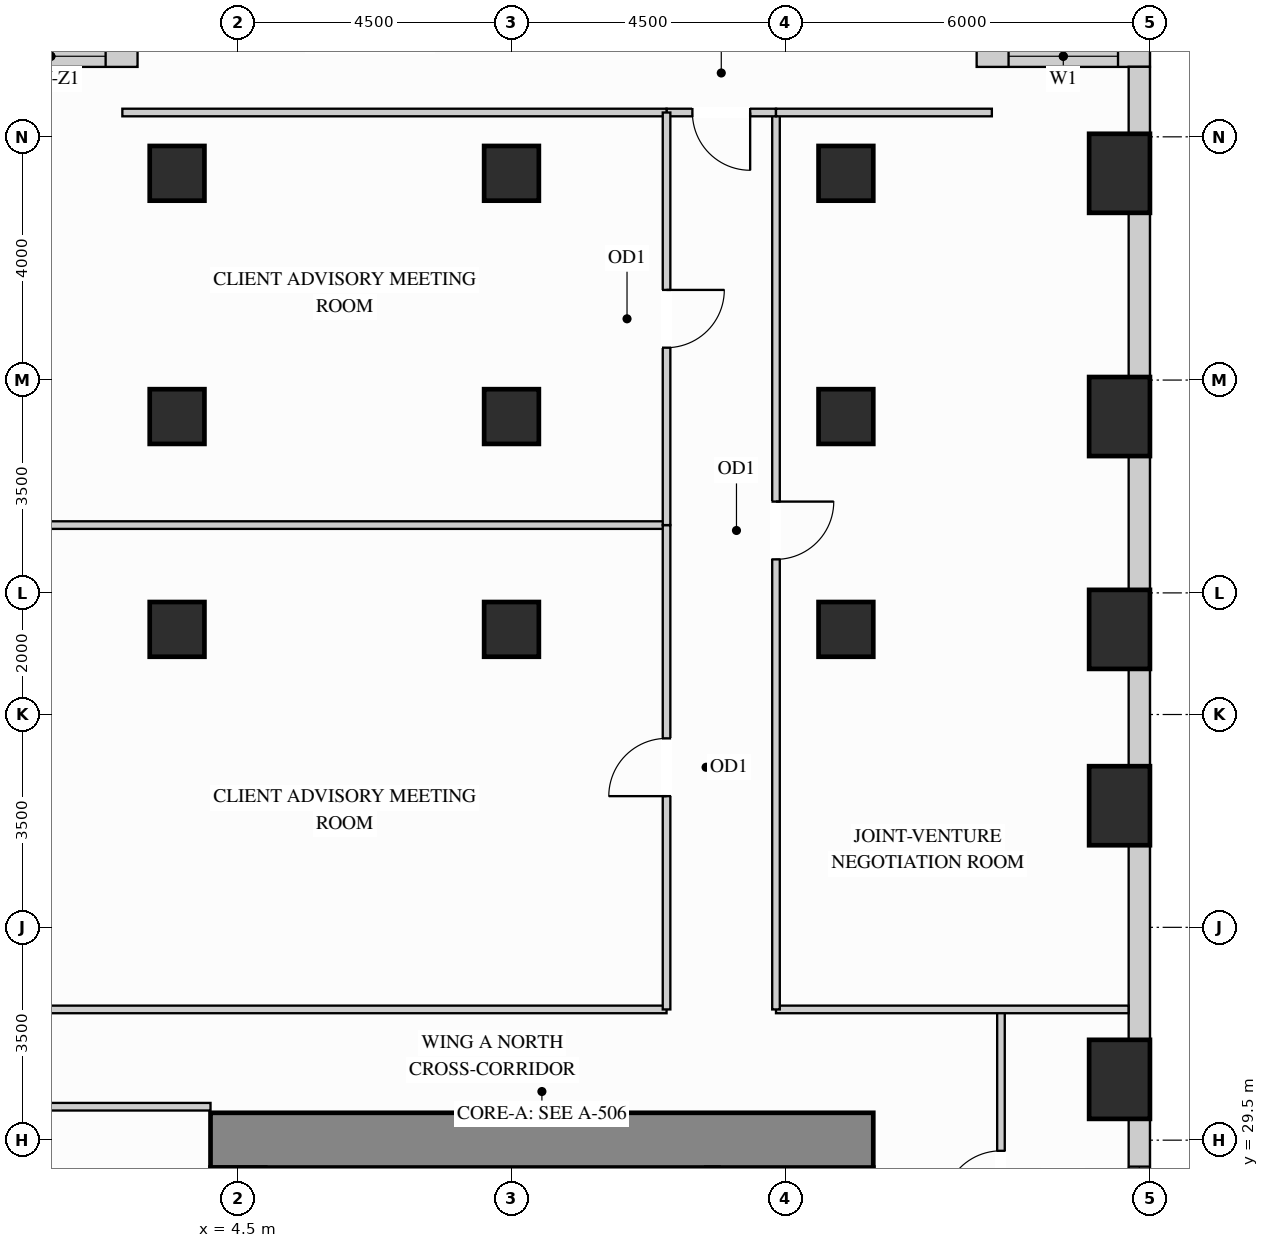
"""IFC4 building model, lengths in metres.
Left out: names, types, materials, properties, quantities, classifications, styles, units other than length and angle.
Written with IfcOpenShell. Run it as: python <this file> out.ifc"""

import sys

from ifc_helpers import new_model, si_unit, direction, frame, frame_2d, origin, origin_2d, place, context, subcontext, project, spatial, rectangle, extrude, source, transform, mapped, element, fill, save


model = new_model("IFC4")
c1 = context("Model", 3, precision=1e-05, world=origin(), true_north=direction((0.0, 1.0)))
c2 = subcontext(c1, "Body", "Model", "MODEL_VIEW")
j1 = project(units=[si_unit("LENGTHUNIT", "METRE"), si_unit("PLANEANGLEUNIT", "RADIAN")], contexts=[c1])
p1 = place(None, origin())
s1 = spatial("IfcSite", under=j1, at=p1, CompositionType="ELEMENT")
p2 = place(p1, origin())
s2 = spatial("IfcBuilding", under=s1, at=p2, CompositionType="ELEMENT")
p3 = place(p2, frame((0.0, 0.0, 62.1)))
s3 = spatial("IfcBuildingStorey", under=s2, at=p3, CompositionType="ELEMENT", Elevation=62.1)
m1 = source(origin(), c2, "Body", "SweptSolid", [
    extrude(rectangle(XDim=0.9, YDim=0.9, at=origin_2d()), origin(), (0.0, 0.0, 1.0), 3.38),
])
for number, where, z_axis, x_axis in (
    (1, (14.5, 37.9, 0.0), (0.0, 0.0, 1.0), (1.0, 0.0, 0.0)),
    (2, (14.5, 41.4, 0.0), (0.0, 0.0, 1.0), (1.0, 0.0, 0.0)),
    (3, (14.5, 45.4, 0.0), (0.0, 0.0, 1.0), (1.0, 0.0, 0.0)),
    (4, (3.5, 37.9, 0.0), (0.0, 0.0, 1.0), (1.0, 0.0, 0.0)),
    (5, (3.5, 41.4, 0.0), (0.0, 0.0, 1.0), (1.0, 0.0, 0.0)),
    (6, (3.5, 45.4, 0.0), (0.0, 0.0, 1.0), (1.0, 0.0, 0.0)),
    (7, (9.0, 37.9, 0.0), (0.0, 0.0, 1.0), (1.0, 0.0, 0.0)),
    (8, (9.0, 41.4, 0.0), (0.0, 0.0, 1.0), (1.0, 0.0, 0.0)),
    (9, (9.0, 45.4, 0.0), (0.0, 0.0, 1.0), (1.0, 0.0, 0.0)),
):
    element("IfcColumn", number, at=place(p3, frame(where, z_axis=z_axis, x_axis=x_axis)), inside=s3, PredefinedType="COLUMN", context=c2, shape_type="MappedRepresentation", body=[
        mapped(m1, transform((0.0, 0.0, 0.0), x_axis=(1.0, 0.0, 0.0), y_axis=(0.0, 1.0, 0.0), z_axis=(0.0, 0.0, 1.0))),
    ])
m2 = source(origin(), c2, "Body", "SweptSolid", [
    extrude(rectangle(XDim=1.0, YDim=1.3, at=origin_2d()), origin(), (0.0, 0.0, 1.0), 3.38),
])
for number, where, z_axis, x_axis in (
    (10, (19.0, 30.5, 0.0), (0.0, 0.0, 1.0), (1.0, 0.0, 0.0)),
    (11, (19.0, 35.0, 0.0), (0.0, 0.0, 1.0), (1.0, 0.0, 0.0)),
    (12, (19.0, 37.9, 0.0), (0.0, 0.0, 1.0), (1.0, 0.0, 0.0)),
    (13, (19.0, 41.4, 0.0), (0.0, 0.0, 1.0), (1.0, 0.0, 0.0)),
    (14, (19.0, 45.4, 0.0), (0.0, 0.0, 1.0), (1.0, 0.0, 0.0)),
):
    element("IfcColumn", number, at=place(p3, frame(where, z_axis=z_axis, x_axis=x_axis)), inside=s3, PredefinedType="COLUMN", context=c2, shape_type="MappedRepresentation", body=[
        mapped(m2, transform((0.0, 0.0, 0.0), x_axis=(1.0, 0.0, 0.0), y_axis=(0.0, 1.0, 0.0), z_axis=(0.0, 0.0, 1.0))),
    ])
m3 = source(origin(), c2, "Body", "SweptSolid", [
    extrude(rectangle(XDim=10.9, YDim=0.9, at=frame_2d((5.45, 0.0))), origin(), (0.0, 0.0, 1.0), 3.38),
])
p4 = place(p3, frame((4.05, 29.5, 0.0), z_axis=(0.0, 0.0, 1.0), x_axis=(1.0, 0.0, 0.0)))
e15 = element("IfcWall", 15, at=p4, inside=s3, PredefinedType="SHEAR", context=c2, shape_type="MappedRepresentation", body=[
    mapped(m3, transform((0.0, 0.0, 0.0), x_axis=(1.0, 0.0, 0.0), y_axis=(0.0, 1.0, 0.0), z_axis=(0.0, 0.0, 1.0))),
])
p5 = place(p3, frame((19.5, 47.325, 0.0), z_axis=(0.0, 0.0, 1.0), x_axis=(-1.0, 0.0, 0.0)))
e16 = element("IfcWall", 16, at=p5, inside=s3, PredefinedType="SOLIDWALL", context=c2, shape_type="SweptSolid", body=[
    extrude(rectangle(XDim=2.85, YDim=0.35, at=frame_2d((1.425, 0.0))), origin(), (0.0, 0.0, 1.0), 3.365),
])
p6 = place(p5, frame((0.525, 0.0, 0.78)))
e17 = element("IfcOpeningElement", 17, at=p6, cuts=e16, PredefinedType="OPENING", context=c2, shape_type="SweptSolid", body=[
    extrude(rectangle(XDim=1.8, YDim=2.1, at=frame_2d((0.9, 1.05))), frame((0.0, 0.185, 0.0), z_axis=(0.0, -1.0, 0.0), x_axis=(1.0, 0.0, 0.0)), (0.0, 0.0, 1.0), 0.37),
])
p7 = place(p3, frame((2.85, 47.325, 0.0), z_axis=(0.0, 0.0, 1.0), x_axis=(-1.0, 0.0, 0.0)))
e18 = element("IfcWall", 18, at=p7, inside=s3, PredefinedType="SOLIDWALL", context=c2, shape_type="SweptSolid", body=[
    extrude(rectangle(XDim=2.85, YDim=0.35, at=frame_2d((1.425, 0.0))), origin(), (0.0, 0.0, 1.0), 3.365),
])
p8 = place(p7, frame((0.525, 0.0, 0.78)))
e19 = element("IfcOpeningElement", 19, at=p8, cuts=e18, PredefinedType="OPENING", context=c2, shape_type="SweptSolid", body=[
    extrude(rectangle(XDim=1.8, YDim=2.1, at=frame_2d((0.9, 1.05))), frame((0.0, 0.185, 0.0), z_axis=(0.0, -1.0, 0.0), x_axis=(1.0, 0.0, 0.0)), (0.0, 0.0, 1.0), 0.37),
])
p9 = place(p3, frame((19.325, 27.448, 0.0), z_axis=(0.0, 0.0, 1.0), x_axis=(0.0, 1.0, 0.0)))
e20 = element("IfcWall", 20, at=p9, inside=s3, PredefinedType="SOLIDWALL", context=c2, shape_type="SweptSolid", body=[
    extrude(rectangle(XDim=2.404, YDim=0.35, at=frame_2d((1.202, 0.0))), origin(), (0.0, 0.0, 1.0), 2.51),
])
p10 = place(p9, frame((0.417, 0.0, 0.78)))
e21 = element("IfcOpeningElement", 21, at=p10, cuts=e20, PredefinedType="OPENING", context=c2, shape_type="SweptSolid", body=[
    extrude(rectangle(XDim=1.2, YDim=1.55, at=frame_2d((0.6, 0.775))), frame((0.0, 0.185, 0.0), z_axis=(0.0, -1.0, 0.0), x_axis=(1.0, 0.0, 0.0)), (0.0, 0.0, 1.0), 0.37),
])
m4 = source(origin(), c2, "Body", "SweptSolid", [
    extrude(rectangle(XDim=3.204, YDim=0.35, at=frame_2d((1.602, 0.0))), origin(), (0.0, 0.0, 1.0), 2.51),
])
p11 = place(p3, frame((19.325, 31.148, 0.0), z_axis=(0.0, 0.0, 1.0), x_axis=(0.0, 1.0, 0.0)))
e22 = element("IfcWall", 22, at=p11, inside=s3, PredefinedType="SOLIDWALL", context=c2, shape_type="MappedRepresentation", body=[
    mapped(m4, transform((0.0, 0.0, 0.0), x_axis=(1.0, 0.0, 0.0), y_axis=(0.0, 1.0, 0.0), z_axis=(0.0, 0.0, 1.0))),
])
m5 = source(origin(), c2, "Body", "SweptSolid", [
    extrude(rectangle(XDim=1.604, YDim=0.35, at=frame_2d((0.802, 0.0))), origin(), (0.0, 0.0, 1.0), 2.51),
])
p12 = place(p3, frame((19.325, 35.648, 0.0), z_axis=(0.0, 0.0, 1.0), x_axis=(0.0, 1.0, 0.0)))
e23 = element("IfcWall", 23, at=p12, inside=s3, PredefinedType="SOLIDWALL", context=c2, shape_type="MappedRepresentation", body=[
    mapped(m5, transform((0.0, 0.0, 0.0), x_axis=(1.0, 0.0, 0.0), y_axis=(0.0, 1.0, 0.0), z_axis=(0.0, 0.0, 1.0))),
])
m6 = source(origin(), c2, "Body", "SweptSolid", [
    extrude(rectangle(XDim=2.204, YDim=0.35, at=frame_2d((1.102, 0.0))), origin(), (0.0, 0.0, 1.0), 2.51),
])
p13 = place(p3, frame((19.325, 38.548, 0.0), z_axis=(0.0, 0.0, 1.0), x_axis=(0.0, 1.0, 0.0)))
e24 = element("IfcWall", 24, at=p13, inside=s3, PredefinedType="SOLIDWALL", context=c2, shape_type="MappedRepresentation", body=[
    mapped(m6, transform((0.0, 0.0, 0.0), x_axis=(1.0, 0.0, 0.0), y_axis=(0.0, 1.0, 0.0), z_axis=(0.0, 0.0, 1.0))),
])
m7 = source(origin(), c2, "Body", "SweptSolid", [
    extrude(rectangle(XDim=2.704, YDim=0.35, at=frame_2d((1.352, 0.0))), origin(), (0.0, 0.0, 1.0), 2.51),
])
p14 = place(p3, frame((19.325, 42.048, 0.0), z_axis=(0.0, 0.0, 1.0), x_axis=(0.0, 1.0, 0.0)))
e25 = element("IfcWall", 25, at=p14, inside=s3, PredefinedType="SOLIDWALL", context=c2, shape_type="MappedRepresentation", body=[
    mapped(m7, transform((0.0, 0.0, 0.0), x_axis=(1.0, 0.0, 0.0), y_axis=(0.0, 1.0, 0.0), z_axis=(0.0, 0.0, 1.0))),
])
m8 = source(origin(), c2, "Body", "SweptSolid", [
    extrude(rectangle(XDim=1.104, YDim=0.35, at=frame_2d((0.552, 0.0))), origin(), (0.0, 0.0, 1.0), 3.365),
])
p15 = place(p3, frame((19.325, 46.048, 0.0), z_axis=(0.0, 0.0, 1.0), x_axis=(0.0, 1.0, 0.0)))
e26 = element("IfcWall", 26, at=p15, inside=s3, PredefinedType="SOLIDWALL", context=c2, shape_type="MappedRepresentation", body=[
    mapped(m8, transform((0.0, 0.0, 0.0), x_axis=(1.0, 0.0, 0.0), y_axis=(0.0, 1.0, 0.0), z_axis=(0.0, 0.0, 1.0))),
])
p16 = place(p3, frame((17.05, 26.05, 0.0), z_axis=(0.0, 0.0, 1.0), x_axis=(0.0, 1.0, 0.0)))
e27 = element("IfcWall", 27, at=p16, inside=s3, PredefinedType="PARTITIONING", context=c2, shape_type="SweptSolid", body=[
    extrude(rectangle(XDim=5.6, YDim=0.125, at=frame_2d((2.8, 0.0))), origin(), (0.0, 0.0, 1.0), 3.365),
])
p17 = place(p16, frame((2.325, 0.0, 0.0)))
e28 = element("IfcOpeningElement", 28, at=p17, cuts=e27, PredefinedType="OPENING", context=c2, shape_type="SweptSolid", body=[
    extrude(rectangle(XDim=0.95, YDim=2.15, at=frame_2d((0.475, 1.075))), frame((0.0, 0.073, 0.0), z_axis=(0.0, -1.0, 0.0), x_axis=(1.0, 0.0, 0.0)), (0.0, 0.0, 1.0), 0.145),
])
m9 = source(origin(), c2, "Body", "SweptSolid", [
    extrude(rectangle(XDim=5.798, YDim=0.125, at=frame_2d((2.899, 0.0))), origin(), (0.0, 0.0, 1.0), 2.828),
])
p18 = place(p3, frame((13.35, 31.65, 0.0), z_axis=(0.0, 0.0, 1.0), x_axis=(1.0, 0.0, 0.0)))
e29 = element("IfcWall", 29, at=p18, inside=s3, PredefinedType="PARTITIONING", context=c2, shape_type="MappedRepresentation", body=[
    mapped(m9, transform((0.0, 0.0, 0.0), x_axis=(1.0, 0.0, 0.0), y_axis=(0.0, 1.0, 0.0), z_axis=(0.0, 0.0, 1.0))),
])
m10 = source(origin(), c2, "Body", "SweptSolid", [
    extrude(rectangle(XDim=11.198, YDim=0.125, at=frame_2d((5.599, 0.0))), origin(), (0.0, 0.0, 1.0), 2.828),
])
for number, where, z_axis, x_axis in (
    (30, (0.352, 31.65, 0.0), (0.0, 0.0, 1.0), (1.0, 0.0, 0.0)),
    (31, (0.352, 39.615, 0.0), (0.0, 0.0, 1.0), (1.0, 0.0, 0.0)),
):
    element("IfcWall", number, at=place(p3, frame(where, z_axis=z_axis, x_axis=x_axis)), inside=s3, PredefinedType="PARTITIONING", context=c2, shape_type="MappedRepresentation", body=[
        mapped(m10, transform((0.0, 0.0, 0.0), x_axis=(1.0, 0.0, 0.0), y_axis=(0.0, 1.0, 0.0), z_axis=(0.0, 0.0, 1.0))),
    ])
m11 = source(origin(), c2, "Body", "SweptSolid", [
    extrude(rectangle(XDim=2.79, YDim=0.125, at=frame_2d((1.395, 0.0))), origin(), (0.0, 0.0, 1.0), 3.365),
])
p19 = place(p3, frame((1.26, 30.05, 0.0), z_axis=(0.0, 0.0, 1.0), x_axis=(1.0, 0.0, 0.0)))
e32 = element("IfcWall", 32, at=p19, inside=s3, PredefinedType="PARTITIONING", context=c2, shape_type="MappedRepresentation", body=[
    mapped(m11, transform((0.0, 0.0, 0.0), x_axis=(1.0, 0.0, 0.0), y_axis=(0.0, 1.0, 0.0), z_axis=(0.0, 0.0, 1.0))),
])
p20 = place(p3, frame((13.35, 31.65, 0.0), z_axis=(0.0, 0.0, 1.0), x_axis=(0.0, 1.0, 0.0)))
e33 = element("IfcWall", 33, at=p20, inside=s3, PredefinedType="PARTITIONING", context=c2, shape_type="SweptSolid", body=[
    extrude(rectangle(XDim=14.75, YDim=0.125, at=frame_2d((7.375, 0.0))), origin(), (0.0, 0.0, 1.0), 3.365),
])
p21 = place(p20, frame((7.402, 0.0, 0.0)))
e34 = element("IfcOpeningElement", 34, at=p21, cuts=e33, PredefinedType="OPENING", context=c2, shape_type="SweptSolid", body=[
    extrude(rectangle(XDim=0.95, YDim=2.15, at=frame_2d((0.475, 1.075))), frame((0.0, 0.073, 0.0), z_axis=(0.0, -1.0, 0.0), x_axis=(1.0, 0.0, 0.0)), (0.0, 0.0, 1.0), 0.145),
])
p22 = place(p3, frame((11.55, 46.4, 0.0), z_axis=(0.0, 0.0, 1.0), x_axis=(1.0, 0.0, 0.0)))
e35 = element("IfcWall", 35, at=p22, inside=s3, PredefinedType="PARTITIONING", context=c2, shape_type="SweptSolid", body=[
    extrude(rectangle(XDim=1.8, YDim=0.125, at=frame_2d((0.9, 0.0))), origin(), (0.0, 0.0, 1.0), 3.365),
])
p23 = place(p22, frame((0.425, 0.0, 0.0)))
e36 = element("IfcOpeningElement", 36, at=p23, cuts=e35, PredefinedType="OPENING", context=c2, shape_type="SweptSolid", body=[
    extrude(rectangle(XDim=0.95, YDim=2.15, at=frame_2d((0.475, 1.075))), frame((0.0, 0.073, 0.0), z_axis=(0.0, -1.0, 0.0), x_axis=(1.0, 0.0, 0.0)), (0.0, 0.0, 1.0), 0.145),
])
m12 = source(origin(), c2, "Body", "SweptSolid", [
    extrude(rectangle(XDim=3.55, YDim=0.125, at=frame_2d((1.775, 0.0))), origin(), (0.0, 0.0, 1.0), 3.365),
])
p24 = place(p3, frame((13.35, 46.4, 0.0), z_axis=(0.0, 0.0, 1.0), x_axis=(1.0, 0.0, 0.0)))
e37 = element("IfcWall", 37, at=p24, inside=s3, PredefinedType="PARTITIONING", context=c2, shape_type="MappedRepresentation", body=[
    mapped(m12, transform((0.0, 0.0, 0.0), x_axis=(1.0, 0.0, 0.0), y_axis=(0.0, 1.0, 0.0), z_axis=(0.0, 0.0, 1.0))),
])
m13 = source(origin(), c2, "Body", "SweptSolid", [
    extrude(rectangle(XDim=8.95, YDim=0.125, at=frame_2d((4.475, 0.0))), origin(), (0.0, 0.0, 1.0), 3.365),
])
p25 = place(p3, frame((2.6, 46.4, 0.0), z_axis=(0.0, 0.0, 1.0), x_axis=(1.0, 0.0, 0.0)))
e38 = element("IfcWall", 38, at=p25, inside=s3, PredefinedType="PARTITIONING", context=c2, shape_type="MappedRepresentation", body=[
    mapped(m13, transform((0.0, 0.0, 0.0), x_axis=(1.0, 0.0, 0.0), y_axis=(0.0, 1.0, 0.0), z_axis=(0.0, 0.0, 1.0))),
])
p26 = place(p3, frame((11.55, 31.65, 0.0), z_axis=(0.0, 0.0, 1.0), x_axis=(0.0, 1.0, 0.0)))
e39 = element("IfcWall", 39, at=p26, inside=s3, PredefinedType="PARTITIONING", context=c2, shape_type="SweptSolid", body=[
    extrude(rectangle(XDim=7.965, YDim=0.125, at=frame_2d((3.982, 0.0))), origin(), (0.0, 0.0, 1.0), 3.365),
])
p27 = place(p26, frame((3.508, 0.0, 0.0)))
e40 = element("IfcOpeningElement", 40, at=p27, cuts=e39, PredefinedType="OPENING", context=c2, shape_type="SweptSolid", body=[
    extrude(rectangle(XDim=0.95, YDim=2.15, at=frame_2d((0.475, 1.075))), frame((0.0, 0.073, 0.0), z_axis=(0.0, -1.0, 0.0), x_axis=(1.0, 0.0, 0.0)), (0.0, 0.0, 1.0), 0.145),
])
p28 = place(p3, frame((11.55, 39.615, 0.0), z_axis=(0.0, 0.0, 1.0), x_axis=(0.0, 1.0, 0.0)))
e41 = element("IfcWall", 41, at=p28, inside=s3, PredefinedType="PARTITIONING", context=c2, shape_type="SweptSolid", body=[
    extrude(rectangle(XDim=6.785, YDim=0.125, at=frame_2d((3.393, 0.0))), origin(), (0.0, 0.0, 1.0), 3.365),
])
p29 = place(p28, frame((2.917, 0.0, 0.0)))
e42 = element("IfcOpeningElement", 42, at=p29, cuts=e41, PredefinedType="OPENING", context=c2, shape_type="SweptSolid", body=[
    extrude(rectangle(XDim=0.95, YDim=2.15, at=frame_2d((0.475, 1.075))), frame((0.0, 0.073, 0.0), z_axis=(0.0, -1.0, 0.0), x_axis=(1.0, 0.0, 0.0)), (0.0, 0.0, 1.0), 0.145),
])
m14 = source(origin(), c2, "Body", "SweptSolid", [
    extrude(rectangle(XDim=0.95, YDim=2.15, at=frame_2d((0.475, 1.075))), frame((0.0, 0.025, 0.0), z_axis=(0.0, -1.0, 0.0), x_axis=(1.0, 0.0, 0.0)), (0.0, 0.0, 1.0), 0.05),
])
p30 = place(p17, origin())
e43 = element("IfcDoor", 43, at=p30, inside=s3, OperationType="SINGLE_SWING_LEFT", PredefinedType="DOOR", context=c2, shape_type="MappedRepresentation", body=[
    mapped(m14, transform((0.0, 0.0, 0.0), x_axis=(1.0, 0.0, 0.0), y_axis=(0.0, 1.0, 0.0), z_axis=(0.0, 0.0, 1.0))),
])
fill(e28, e43)
p31 = place(p21, origin())
e44 = element("IfcDoor", 44, at=p31, inside=s3, OperationType="SINGLE_SWING_RIGHT", PredefinedType="DOOR", context=c2, shape_type="MappedRepresentation", body=[
    mapped(m14, transform((0.0, 0.0, 0.0), x_axis=(1.0, 0.0, 0.0), y_axis=(0.0, 1.0, 0.0), z_axis=(0.0, 0.0, 1.0))),
])
fill(e34, e44)
p32 = place(p23, origin())
e45 = element("IfcDoor", 45, at=p32, inside=s3, OperationType="SINGLE_SWING_RIGHT", PredefinedType="DOOR", context=c2, shape_type="MappedRepresentation", body=[
    mapped(m14, transform((0.0, 0.0, 0.0), x_axis=(1.0, 0.0, 0.0), y_axis=(0.0, 1.0, 0.0), z_axis=(0.0, 0.0, 1.0))),
])
fill(e36, e45)
p33 = place(p27, origin())
e46 = element("IfcDoor", 46, at=p33, inside=s3, OperationType="SINGLE_SWING_LEFT", PredefinedType="DOOR", context=c2, shape_type="MappedRepresentation", body=[
    mapped(m14, transform((0.0, 0.0, 0.0), x_axis=(1.0, 0.0, 0.0), y_axis=(0.0, 1.0, 0.0), z_axis=(0.0, 0.0, 1.0))),
])
fill(e40, e46)
p34 = place(p29, origin())
e47 = element("IfcDoor", 47, at=p34, inside=s3, OperationType="SINGLE_SWING_RIGHT", PredefinedType="DOOR", context=c2, shape_type="MappedRepresentation", body=[
    mapped(m14, transform((0.0, 0.0, 0.0), x_axis=(1.0, 0.0, 0.0), y_axis=(0.0, 1.0, 0.0), z_axis=(0.0, 0.0, 1.0))),
])
fill(e42, e47)
m15 = source(origin(), c2, "Body", "SweptSolid", [
    extrude(rectangle(XDim=1.8, YDim=2.1, at=frame_2d((0.9, 1.05))), frame((0.0, 0.03, 0.0), z_axis=(0.0, -1.0, 0.0), x_axis=(1.0, 0.0, 0.0)), (0.0, 0.0, 1.0), 0.06),
])
p35 = place(p6, origin())
e48 = element("IfcWindow", 48, at=p35, inside=s3, PartitioningType="SINGLE_PANEL", PredefinedType="WINDOW", context=c2, shape_type="MappedRepresentation", body=[
    mapped(m15, transform((0.0, 0.0, 0.0), x_axis=(1.0, 0.0, 0.0), y_axis=(0.0, 1.0, 0.0), z_axis=(0.0, 0.0, 1.0))),
])
fill(e17, e48)
p36 = place(p8, origin())
e49 = element("IfcWindow", 49, at=p36, inside=s3, PartitioningType="SINGLE_PANEL", PredefinedType="WINDOW", context=c2, shape_type="MappedRepresentation", body=[
    mapped(m15, transform((0.0, 0.0, 0.0), x_axis=(1.0, 0.0, 0.0), y_axis=(0.0, 1.0, 0.0), z_axis=(0.0, 0.0, 1.0))),
])
fill(e19, e49)
m16 = source(origin(), c2, "Body", "SweptSolid", [
    extrude(rectangle(XDim=1.2, YDim=1.55, at=frame_2d((0.6, 0.775))), frame((0.0, 0.03, 0.0), z_axis=(0.0, -1.0, 0.0), x_axis=(1.0, 0.0, 0.0)), (0.0, 0.0, 1.0), 0.06),
])
p37 = place(p10, origin())
e50 = element("IfcWindow", 50, at=p37, inside=s3, PartitioningType="SINGLE_PANEL", PredefinedType="WINDOW", context=c2, shape_type="MappedRepresentation", body=[
    mapped(m16, transform((0.0, 0.0, 0.0), x_axis=(1.0, 0.0, 0.0), y_axis=(0.0, 1.0, 0.0), z_axis=(0.0, 0.0, 1.0))),
])
fill(e21, e50)
save(model, sys.argv[1])
